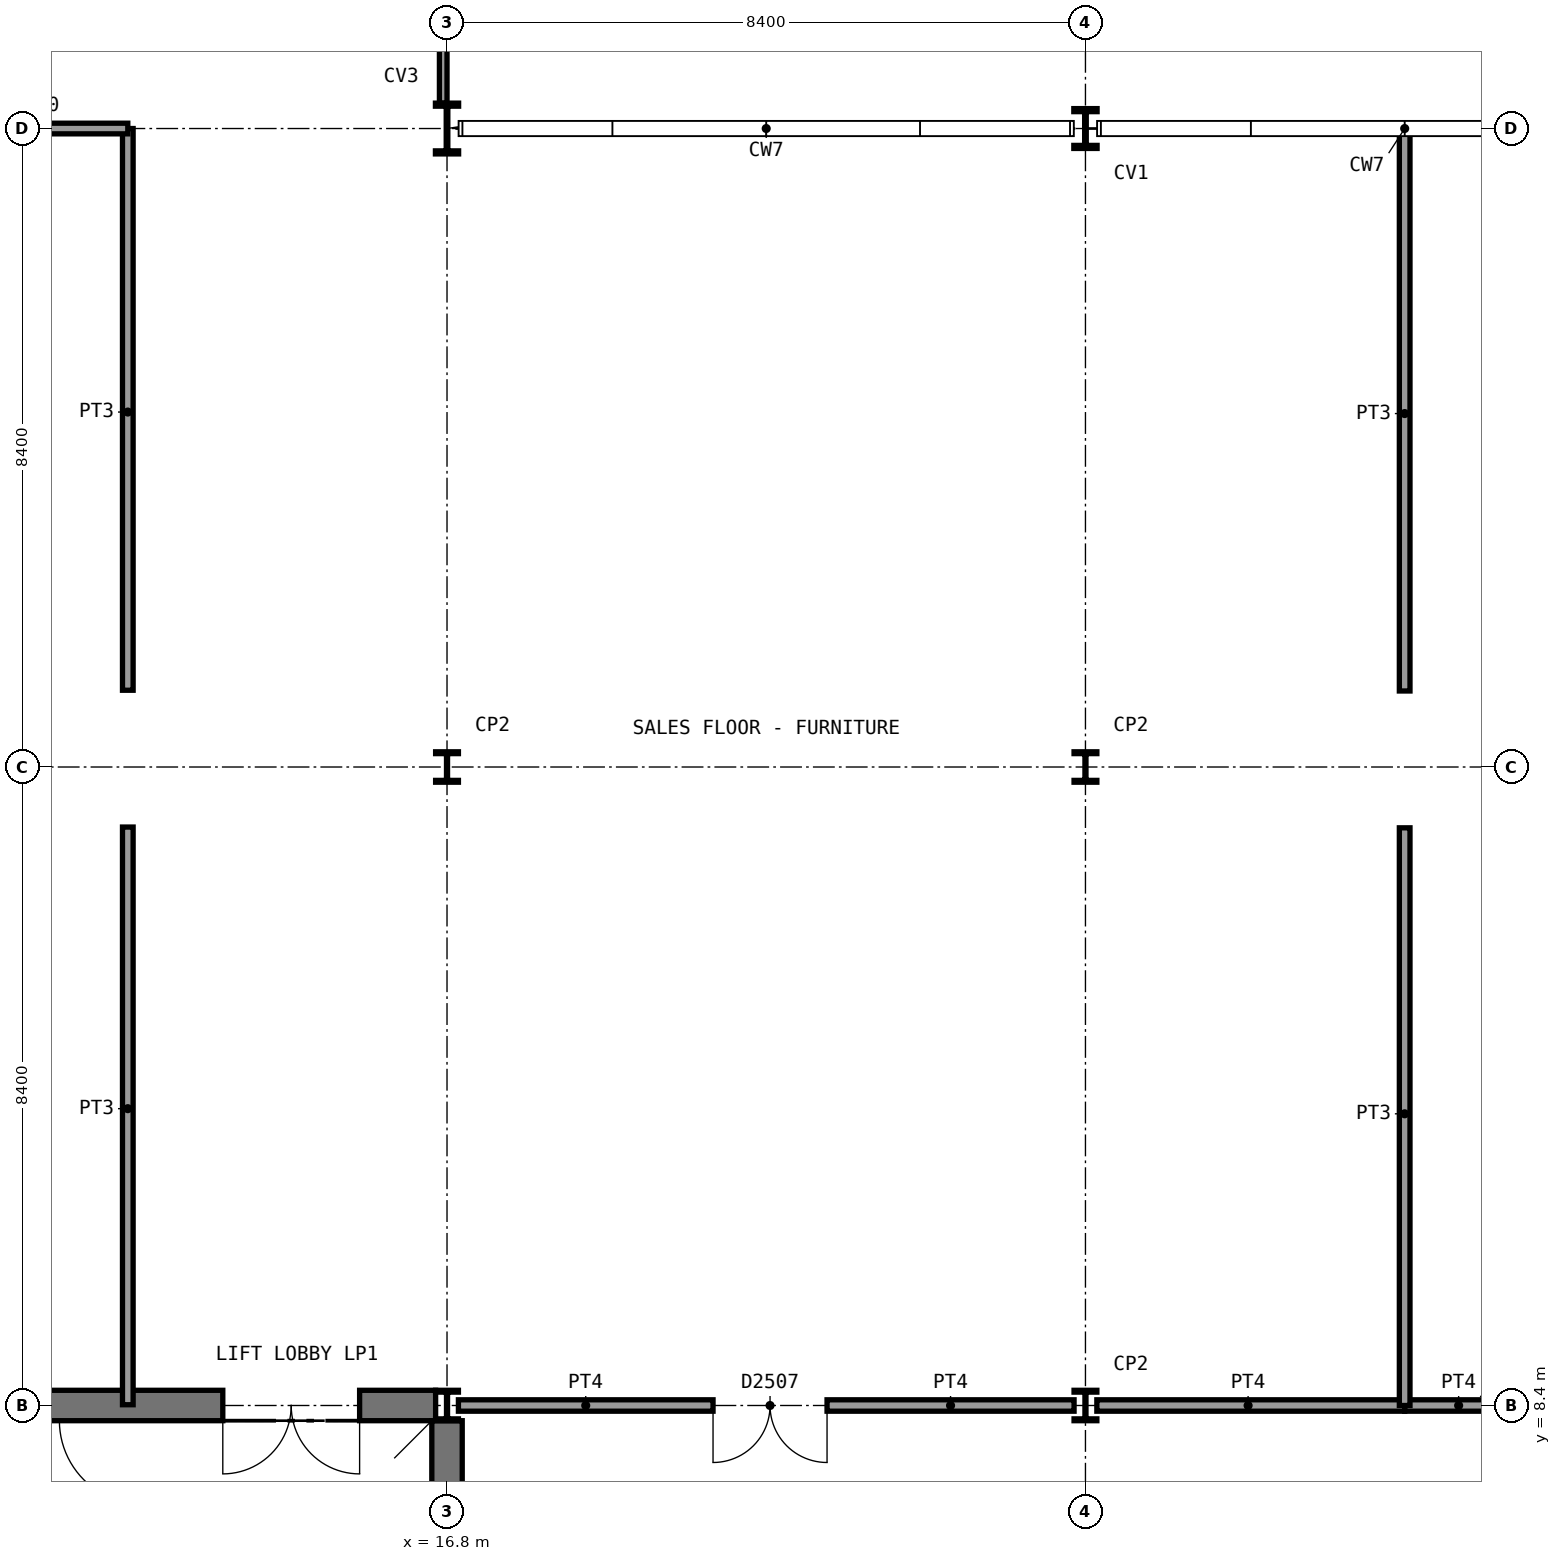
"""IFC4 building model, lengths in metres.
Left out: names, types, materials, properties, quantities, classifications, styles, units other than length and angle.
Written with IfcOpenShell. Run it as: python <this file> out.ifc"""

import sys

from ifc_helpers import new_model, si_unit, direction, frame, frame_2d, origin, origin_2d, place, context, subcontext, project, spatial, rectangle, i_section, extrude, element, fill, save


model = new_model("IFC4")
c1 = context("Model", 3, precision=1e-05, world=origin(), true_north=direction((0.0, 1.0)))
c2 = subcontext(c1, "Body", "Model", "MODEL_VIEW")
j1 = project(units=[si_unit("LENGTHUNIT", "METRE"), si_unit("PLANEANGLEUNIT", "RADIAN")], contexts=[c1])
p1 = place(None, origin())
s1 = spatial("IfcSite", under=j1, at=p1, CompositionType="ELEMENT")
p2 = place(p1, origin())
s2 = spatial("IfcBuilding", under=s1, at=p2, CompositionType="ELEMENT")
p3 = place(p2, frame((0.0, 0.0, 16.2)))
s3 = spatial("IfcBuildingStorey", under=s2, at=p3, CompositionType="ELEMENT", Elevation=16.2)
p4 = place(p3, frame((8.55, 8.4, 0.0), z_axis=(0.0, 0.0, 1.0), x_axis=(1.0, 0.0, 0.0)))
e1 = element("IfcWall", 1, at=p4, inside=s3, PredefinedType="SHEAR", context=c2, shape_type="SweptSolid", body=[
    extrude(rectangle(XDim=8.1, YDim=0.4, at=frame_2d((4.05, 0.0))), origin(), (0.0, 0.0, 1.0), 4.65),
])
p5 = place(p4, frame((1.15, 0.0, 0.0)))
e2 = element("IfcOpeningElement", 2, at=p5, cuts=e1, PredefinedType="OPENING", context=c2, shape_type="SweptSolid", body=[
    extrude(rectangle(XDim=1.8, YDim=2.1, at=frame_2d((0.9, 1.05))), frame((0.0, 0.21, 0.0), z_axis=(0.0, -1.0, 0.0), x_axis=(1.0, 0.0, 0.0)), (0.0, 0.0, 1.0), 0.42),
])
p6 = place(p4, frame((5.3, 0.0, 0.0)))
e3 = element("IfcOpeningElement", 3, at=p6, cuts=e1, PredefinedType="OPENING", context=c2, shape_type="SweptSolid", body=[
    extrude(rectangle(XDim=1.8, YDim=2.1, at=frame_2d((0.9, 1.05))), frame((0.0, 0.21, 0.0), z_axis=(0.0, -1.0, 0.0), x_axis=(1.0, 0.0, 0.0)), (0.0, 0.0, 1.0), 0.42),
])
p7 = place(p3, frame((16.8, 0.2, 0.0), z_axis=(0.0, 0.0, 1.0), x_axis=(0.0, 1.0, 0.0)))
e4 = element("IfcWall", 4, at=p7, inside=s3, PredefinedType="SHEAR", context=c2, shape_type="SweptSolid", body=[
    extrude(rectangle(XDim=8.0, YDim=0.4, at=frame_2d((4.0, 0.0))), origin(), (0.0, 0.0, 1.0), 4.65),
])
for number, where, z_axis, x_axis in (
    (5, (16.8, 8.4, 0.0), (0.0, 0.0, 1.0), (1.0, 0.0, 0.0)),
    (6, (16.8, 16.8, 0.0), (0.0, 0.0, 1.0), (1.0, 0.0, 0.0)),
):
    element("IfcColumn", number, at=place(p3, frame(where, z_axis=z_axis, x_axis=x_axis)), inside=s3, PredefinedType="COLUMN", context=c2, shape_type="SweptSolid", body=[
        extrude(i_section(OverallWidth=0.3, OverallDepth=0.4, WebThickness=0.013, FlangeThickness=0.024, FilletRadius=0.027, at=origin_2d()), origin(), (0.0, 0.0, 1.0), 4.8),
    ])
p8 = place(p3, frame((16.8, 25.2, 0.0), z_axis=(0.0, 0.0, 1.0), x_axis=(1.0, 0.0, 0.0)))
e7 = element("IfcColumn", 7, at=p8, inside=s3, PredefinedType="COLUMN", context=c2, shape_type="SweptSolid", body=[
    extrude(i_section(OverallWidth=0.305, OverallDepth=0.668, WebThickness=0.021, FlangeThickness=0.04, FilletRadius=0.027, at=origin_2d()), origin(), (0.0, 0.0, 1.0), 4.8),
])
for number, where, z_axis, x_axis in (
    (8, (25.2, 8.4, 0.0), (0.0, 0.0, 1.0), (1.0, 0.0, 0.0)),
    (9, (25.2, 16.8, 0.0), (0.0, 0.0, 1.0), (1.0, 0.0, 0.0)),
):
    element("IfcColumn", number, at=place(p3, frame(where, z_axis=z_axis, x_axis=x_axis)), inside=s3, PredefinedType="COLUMN", context=c2, shape_type="SweptSolid", body=[
        extrude(i_section(OverallWidth=0.3, OverallDepth=0.4, WebThickness=0.013, FlangeThickness=0.024, FilletRadius=0.027, at=origin_2d()), origin(), (0.0, 0.0, 1.0), 4.8),
    ])
p9 = place(p3, frame((25.2, 25.2, 0.0), z_axis=(0.0, 0.0, 1.0), x_axis=(1.0, 0.0, 0.0)))
e10 = element("IfcColumn", 10, at=p9, inside=s3, PredefinedType="COLUMN", context=c2, shape_type="SweptSolid", body=[
    extrude(i_section(OverallWidth=0.306, OverallDepth=0.524, WebThickness=0.021, FlangeThickness=0.04, FilletRadius=0.027, at=origin_2d()), origin(), (0.0, 0.0, 1.0), 4.8),
])
p10 = place(p3, frame((16.95, 8.4, 0.0), z_axis=(0.0, 0.0, 1.0), x_axis=(1.0, 0.0, 0.0)))
e11 = element("IfcWall", 11, at=p10, inside=s3, PredefinedType="SOLIDWALL", context=c2, shape_type="SweptSolid", body=[
    extrude(rectangle(XDim=8.1, YDim=0.15, at=frame_2d((4.05, 0.0))), origin(), (0.0, 0.0, 1.0), 4.32),
])
p11 = place(p10, frame((3.35, 0.0, 0.0)))
e12 = element("IfcOpeningElement", 12, at=p11, cuts=e11, PredefinedType="OPENING", context=c2, shape_type="SweptSolid", body=[
    extrude(rectangle(XDim=1.5, YDim=2.1, at=frame_2d((0.75, 1.05))), frame((0.0, 0.085, 0.0), z_axis=(0.0, -1.0, 0.0), x_axis=(1.0, 0.0, 0.0)), (0.0, 0.0, 1.0), 0.17),
])
p12 = place(p3, frame((25.35, 8.4, 0.0), z_axis=(0.0, 0.0, 1.0), x_axis=(1.0, 0.0, 0.0)))
e13 = element("IfcWall", 13, at=p12, inside=s3, PredefinedType="SOLIDWALL", context=c2, shape_type="SweptSolid", body=[
    extrude(rectangle(XDim=4.05, YDim=0.15, at=frame_2d((2.025, 0.0))), origin(), (0.0, 0.0, 1.0), 4.32),
])
p13 = place(p3, frame((29.4, 8.4, 0.0), z_axis=(0.0, 0.0, 1.0), x_axis=(1.0, 0.0, 0.0)))
e14 = element("IfcWall", 14, at=p13, inside=s3, PredefinedType="SOLIDWALL", context=c2, shape_type="SweptSolid", body=[
    extrude(rectangle(XDim=4.05, YDim=0.15, at=frame_2d((2.025, 0.0))), origin(), (0.0, 0.0, 1.0), 4.32),
])
p14 = place(p13, frame((1.35, 0.0, 0.0)))
e15 = element("IfcOpeningElement", 15, at=p14, cuts=e14, PredefinedType="OPENING", context=c2, shape_type="SweptSolid", body=[
    extrude(rectangle(XDim=1.5, YDim=2.1, at=frame_2d((0.75, 1.05))), frame((0.0, 0.085, 0.0), z_axis=(0.0, -1.0, 0.0), x_axis=(1.0, 0.0, 0.0)), (0.0, 0.0, 1.0), 0.17),
])
p15 = place(p3, frame((12.6, 8.41, 0.0), z_axis=(0.0, 0.0, 1.0), x_axis=(0.0, 1.0, 0.0)))
e16 = element("IfcWall", 16, at=p15, inside=s3, PredefinedType="PARTITIONING", context=c2, shape_type="SweptSolid", body=[
    extrude(rectangle(XDim=7.6, YDim=0.14, at=frame_2d((3.8, 0.0))), origin(), (0.0, 0.0, 1.0), 4.65),
])
p16 = place(p3, frame((12.6, 17.81, 0.0), z_axis=(0.0, 0.0, 1.0), x_axis=(0.0, 1.0, 0.0)))
e17 = element("IfcWall", 17, at=p16, inside=s3, PredefinedType="PARTITIONING", context=c2, shape_type="SweptSolid", body=[
    extrude(rectangle(XDim=7.39, YDim=0.14, at=frame_2d((3.695, 0.0))), origin(), (0.0, 0.0, 1.0), 4.65),
])
p17 = place(p3, frame((8.552, 25.2, 0.0), z_axis=(0.0, 0.0, 1.0), x_axis=(1.0, 0.0, 0.0)))
e18 = element("IfcWall", 18, at=p17, inside=s3, PredefinedType="PARTITIONING", context=c2, shape_type="SweptSolid", body=[
    extrude(rectangle(XDim=4.048, YDim=0.14, at=frame_2d((2.024, 0.0))), origin(), (0.0, 0.0, 1.0), 4.32),
])
p18 = place(p3, frame((29.4, 8.4, 0.0), z_axis=(0.0, 0.0, 1.0), x_axis=(0.0, 1.0, 0.0)))
e19 = element("IfcWall", 19, at=p18, inside=s3, PredefinedType="PARTITIONING", context=c2, shape_type="SweptSolid", body=[
    extrude(rectangle(XDim=7.6, YDim=0.14, at=frame_2d((3.8, 0.0))), origin(), (0.0, 0.0, 1.0), 4.65),
])
p19 = place(p3, frame((29.4, 17.8, 0.0), z_axis=(0.0, 0.0, 1.0), x_axis=(0.0, 1.0, 0.0)))
e20 = element("IfcWall", 20, at=p19, inside=s3, PredefinedType="PARTITIONING", context=c2, shape_type="SweptSolid", body=[
    extrude(rectangle(XDim=7.4, YDim=0.14, at=frame_2d((3.7, 0.0))), origin(), (0.0, 0.0, 1.0), 4.65),
])
p20 = place(p3, frame((12.8, 0.2, 0.0), z_axis=(0.0, 0.0, 1.0), x_axis=(0.0, 1.0, 0.0)))
e21 = element("IfcWall", 21, at=p20, inside=s3, PredefinedType="SHEAR", context=c2, shape_type="SweptSolid", body=[
    extrude(rectangle(XDim=8.0, YDim=0.2, at=frame_2d((4.0, 0.0))), origin(), (0.0, 0.0, 1.0), 4.65),
])
p21 = place(p20, frame((6.9, 0.0, 0.0)))
e22 = element("IfcOpeningElement", 22, at=p21, cuts=e21, PredefinedType="OPENING", context=c2, shape_type="SweptSolid", body=[
    extrude(rectangle(XDim=1.11, YDim=2.1, at=frame_2d((0.555, 1.05))), frame((0.0, 0.11, 0.0), z_axis=(0.0, -1.0, 0.0), x_axis=(1.0, 0.0, 0.0)), (0.0, 0.0, 1.0), 0.22),
])
p22 = place(p3, frame((16.75, 25.534, 0.0), z_axis=(0.0, 0.0, 1.0), x_axis=(0.0, 1.0, 0.0)))
e23 = element("IfcWall", 23, at=p22, inside=s3, PredefinedType="PARTITIONING", context=c2, shape_type="SweptSolid", body=[
    extrude(rectangle(XDim=11.932, YDim=0.1, at=frame_2d((5.966, 0.0))), origin(), (0.0, 0.0, 1.0), 3.76),
])
p23 = place(p11, frame((1.5, 0.0, 0.0), z_axis=(0.0, 0.0, 1.0), x_axis=(-1.0, 0.0, 0.0)))
e24 = element("IfcDoor", 24, at=p23, inside=s3, OperationType="DOUBLE_DOOR_SINGLE_SWING", PredefinedType="DOOR", context=c2, shape_type="SweptSolid", body=[
    extrude(rectangle(XDim=1.5, YDim=2.1, at=frame_2d((0.75, 1.05))), frame((0.0, 0.025, 0.0), z_axis=(0.0, -1.0, 0.0), x_axis=(1.0, 0.0, 0.0)), (0.0, 0.0, 1.0), 0.05),
])
fill(e12, e24)
p24 = place(p21, origin())
e25 = element("IfcDoor", 25, at=p24, inside=s3, OperationType="SINGLE_SWING_RIGHT", PredefinedType="DOOR", context=c2, shape_type="SweptSolid", body=[
    extrude(rectangle(XDim=1.1, YDim=2.1, at=frame_2d((0.55, 1.05))), frame((0.0, 0.025, 0.0), z_axis=(0.0, -1.0, 0.0), x_axis=(1.0, 0.0, 0.0)), (0.0, 0.0, 1.0), 0.05),
])
fill(e22, e25)
p25 = place(p6, frame((1.8, 0.0, 0.0), z_axis=(0.0, 0.0, 1.0), x_axis=(-1.0, 0.0, 0.0)))
e26 = element("IfcDoor", 26, at=p25, inside=s3, OperationType="DOUBLE_DOOR_SINGLE_SWING", PredefinedType="DOOR", context=c2, shape_type="SweptSolid", body=[
    extrude(rectangle(XDim=1.8, YDim=2.1, at=frame_2d((0.9, 1.05))), frame((0.0, 0.025, 0.0), z_axis=(0.0, -1.0, 0.0), x_axis=(1.0, 0.0, 0.0)), (0.0, 0.0, 1.0), 0.05),
])
fill(e3, e26)
save(model, sys.argv[1])
